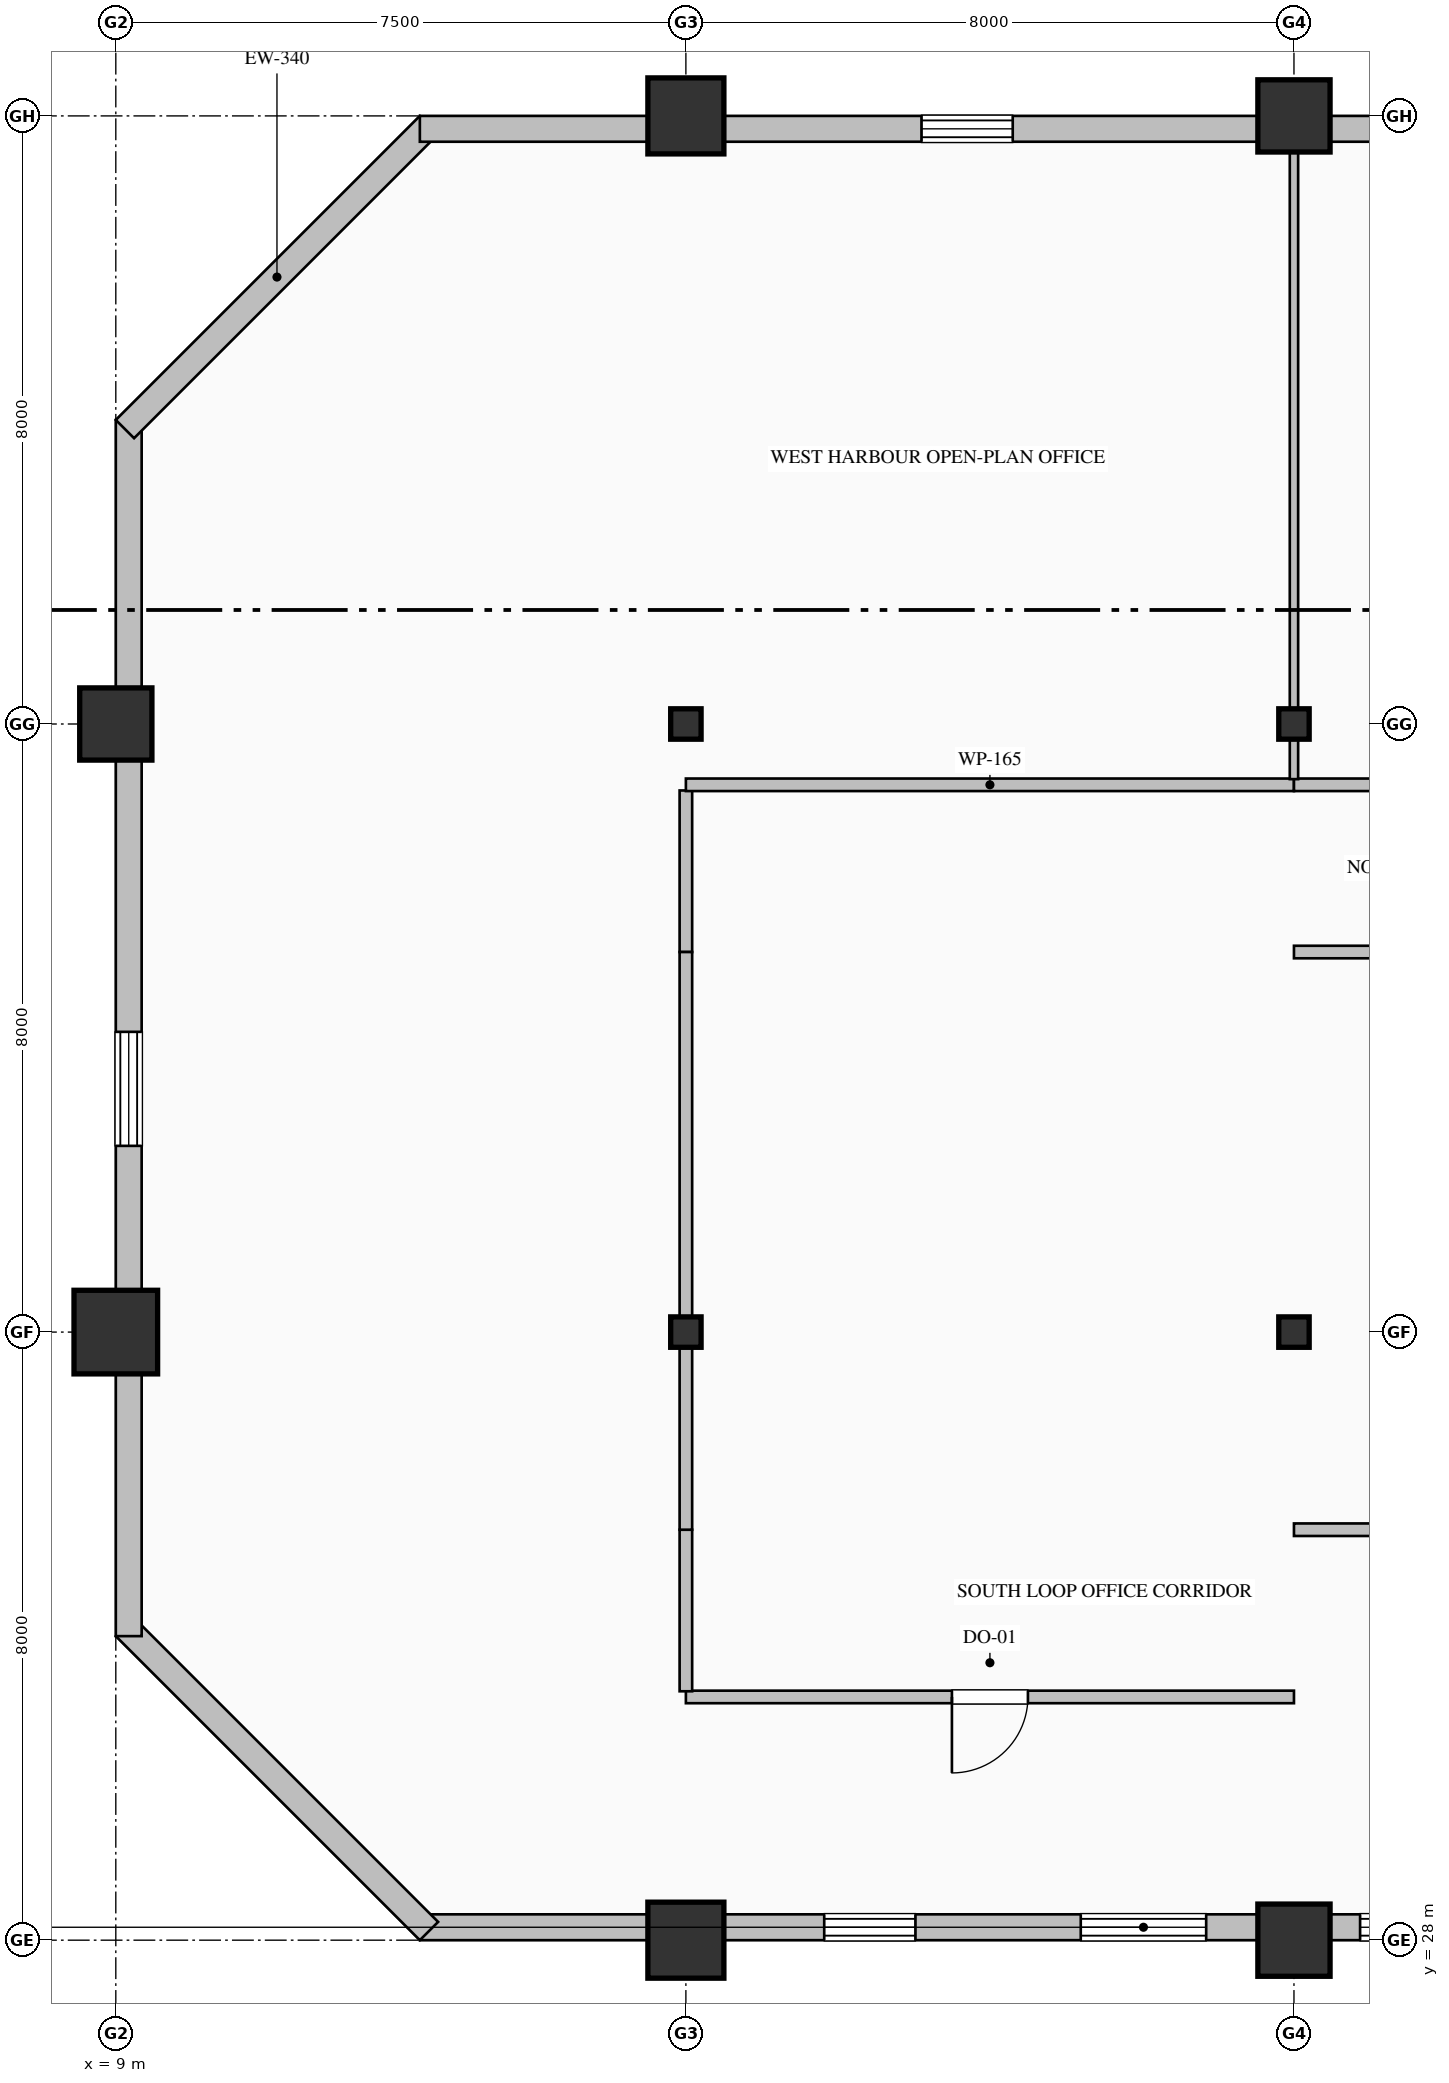
"""IFC4 building model, lengths in metres.
Left out: names, types, materials, properties, quantities, classifications, styles, units other than length and angle.
Written with IfcOpenShell. Run it as: python <this file> out.ifc"""

import sys

from ifc_helpers import new_model, si_unit, direction, frame, frame_2d, origin, origin_2d, place, context, subcontext, project, spatial, rectangle, hollow_rectangle, hollow_circle, i_section, extrude, element, fill, save


model = new_model("IFC4")
c1 = context("Model", 3, precision=1e-05, world=origin(), true_north=direction((0.0, 1.0)))
c2 = subcontext(c1, "Body", "Model", "MODEL_VIEW")
j1 = project(units=[si_unit("LENGTHUNIT", "METRE"), si_unit("PLANEANGLEUNIT", "RADIAN")], contexts=[c1])
p1 = place(None, origin())
s1 = spatial("IfcSite", under=j1, at=p1, CompositionType="ELEMENT")
p2 = place(p1, origin())
s2 = spatial("IfcBuilding", under=s1, at=p2, CompositionType="ELEMENT")
p3 = place(p2, frame((0.0, 0.0, 147.0)))
s3 = spatial("IfcBuildingStorey", under=s2, at=p3, CompositionType="ELEMENT", Elevation=147.0)
p4 = place(p3, frame((9.0, 36.0, 0.0), z_axis=(0.0, 0.0, 1.0), x_axis=(1.0, 0.0, 0.0)))
e1 = element("IfcColumn", 1, at=p4, inside=s3, PredefinedType="COLUMN", context=c2, shape_type="SweptSolid", body=[
    extrude(hollow_rectangle(XDim=1.1, YDim=1.1, WallThickness=0.04, at=origin_2d()), origin(), (0.0, 0.0, 1.0), 4.0),
])
p5 = place(p3, frame((9.0, 44.0, 0.0), z_axis=(0.0, 0.0, 1.0), x_axis=(1.0, 0.0, 0.0)))
e2 = element("IfcColumn", 2, at=p5, inside=s3, PredefinedType="COLUMN", context=c2, shape_type="SweptSolid", body=[
    extrude(hollow_rectangle(XDim=0.95, YDim=0.95, WallThickness=0.036, at=origin_2d()), origin(), (0.0, 0.0, 1.0), 4.0),
])
p6 = place(p3, frame((16.5, 28.0, 0.0), z_axis=(0.0, 0.0, 1.0), x_axis=(1.0, 0.0, 0.0)))
e3 = element("IfcColumn", 3, at=p6, inside=s3, PredefinedType="COLUMN", context=c2, shape_type="SweptSolid", body=[
    extrude(hollow_circle(Radius=0.5, WallThickness=0.036, at=origin_2d()), origin(), (0.0, 0.0, 1.0), 4.0),
])
for number, where, z_axis, x_axis in (
    (4, (16.5, 36.0, 0.0), (0.0, 0.0, 1.0), (1.0, 0.0, 0.0)),
    (5, (16.5, 44.0, 0.0), (0.0, 0.0, 1.0), (1.0, 0.0, 0.0)),
):
    element("IfcColumn", number, at=place(p3, frame(where, z_axis=z_axis, x_axis=x_axis)), inside=s3, PredefinedType="COLUMN", context=c2, shape_type="SweptSolid", body=[
        extrude(i_section(OverallWidth=0.4, OverallDepth=0.4, WebThickness=0.013, FlangeThickness=0.021, FilletRadius=0.022, at=origin_2d()), origin(), (0.0, 0.0, 1.0), 4.0),
    ])
p7 = place(p3, frame((16.5, 52.0, 0.0), z_axis=(0.0, 0.0, 1.0), x_axis=(1.0, 0.0, 0.0)))
e6 = element("IfcColumn", 6, at=p7, inside=s3, PredefinedType="COLUMN", context=c2, shape_type="SweptSolid", body=[
    extrude(hollow_circle(Radius=0.5, WallThickness=0.036, at=origin_2d()), origin(), (0.0, 0.0, 1.0), 4.0),
])
p8 = place(p3, frame((24.5, 28.0, 0.0), z_axis=(0.0, 0.0, 1.0), x_axis=(1.0, 0.0, 0.0)))
e7 = element("IfcColumn", 7, at=p8, inside=s3, PredefinedType="COLUMN", context=c2, shape_type="SweptSolid", body=[
    extrude(hollow_rectangle(XDim=0.95, YDim=0.95, WallThickness=0.036, at=origin_2d()), origin(), (0.0, 0.0, 1.0), 4.0),
])
for number, where, z_axis, x_axis in (
    (8, (24.5, 36.0, 0.0), (0.0, 0.0, 1.0), (1.0, 0.0, 0.0)),
    (9, (24.5, 44.0, 0.0), (0.0, 0.0, 1.0), (1.0, 0.0, 0.0)),
):
    element("IfcColumn", number, at=place(p3, frame(where, z_axis=z_axis, x_axis=x_axis)), inside=s3, PredefinedType="COLUMN", context=c2, shape_type="SweptSolid", body=[
        extrude(i_section(OverallWidth=0.4, OverallDepth=0.4, WebThickness=0.013, FlangeThickness=0.021, FilletRadius=0.022, at=origin_2d()), origin(), (0.0, 0.0, 1.0), 4.0),
    ])
p9 = place(p3, frame((24.5, 52.0, 0.0), z_axis=(0.0, 0.0, 1.0), x_axis=(1.0, 0.0, 0.0)))
e10 = element("IfcColumn", 10, at=p9, inside=s3, PredefinedType="COLUMN", context=c2, shape_type="SweptSolid", body=[
    extrude(hollow_rectangle(XDim=0.95, YDim=0.95, WallThickness=0.036, at=origin_2d()), origin(), (0.0, 0.0, 1.0), 4.0),
])
p10 = place(p3, frame((40.52, 28.17, 0.0), z_axis=(0.0, 0.0, 1.0), x_axis=(-1.0, 0.0, 0.0)))
e11 = element("IfcWall", 11, at=p10, inside=s3, PredefinedType="SOLIDWALL", context=c2, shape_type="SweptSolid", body=[
    extrude(rectangle(XDim=27.52, YDim=0.34, at=frame_2d((13.76, 0.0))), origin(), (0.0, 0.0, 1.0), 3.165),
])
p11 = place(p10, frame((2.85, 0.0, 0.85)))
e12 = element("IfcOpeningElement", 12, at=p11, cuts=e11, PredefinedType="OPENING", context=c2, shape_type="SweptSolid", body=[
    extrude(rectangle(XDim=1.5, YDim=1.95, at=frame_2d((0.75, 0.975))), frame((0.0, 0.18, 0.0), z_axis=(0.0, -1.0, 0.0), x_axis=(1.0, 0.0, 0.0)), (0.0, 0.0, 1.0), 0.36),
])
p12 = place(p10, frame((10.2, 0.0, 0.7)))
e13 = element("IfcOpeningElement", 13, at=p12, cuts=e11, PredefinedType="OPENING", context=c2, shape_type="SweptSolid", body=[
    extrude(rectangle(XDim=1.2, YDim=1.85, at=frame_2d((0.6, 0.925))), frame((0.0, 0.18, 0.0), z_axis=(0.0, -1.0, 0.0), x_axis=(1.0, 0.0, 0.0)), (0.0, 0.0, 1.0), 0.36),
])
p13 = place(p10, frame((13.65, 0.0, 0.85)))
e14 = element("IfcOpeningElement", 14, at=p13, cuts=e11, PredefinedType="OPENING", context=c2, shape_type="SweptSolid", body=[
    extrude(rectangle(XDim=1.5, YDim=1.95, at=frame_2d((0.75, 0.975))), frame((0.0, 0.18, 0.0), z_axis=(0.0, -1.0, 0.0), x_axis=(1.0, 0.0, 0.0)), (0.0, 0.0, 1.0), 0.36),
])
p14 = place(p10, frame((17.175, 0.0, 0.85)))
e15 = element("IfcOpeningElement", 15, at=p14, cuts=e11, PredefinedType="OPENING", context=c2, shape_type="SweptSolid", body=[
    extrude(rectangle(XDim=1.65, YDim=1.95, at=frame_2d((0.825, 0.975))), frame((0.0, 0.18, 0.0), z_axis=(0.0, -1.0, 0.0), x_axis=(1.0, 0.0, 0.0)), (0.0, 0.0, 1.0), 0.36),
])
p15 = place(p10, frame((21.0, 0.0, 0.7)))
e16 = element("IfcOpeningElement", 16, at=p15, cuts=e11, PredefinedType="OPENING", context=c2, shape_type="SweptSolid", body=[
    extrude(rectangle(XDim=1.2, YDim=1.85, at=frame_2d((0.6, 0.925))), frame((0.0, 0.18, 0.0), z_axis=(0.0, -1.0, 0.0), x_axis=(1.0, 0.0, 0.0)), (0.0, 0.0, 1.0), 0.36),
])
p16 = place(p3, frame((13.12, 28.12, 0.0), z_axis=(0.0, 0.0, 1.0), x_axis=(-0.707106781187, 0.707106781187, 0.0)))
e17 = element("IfcWall", 17, at=p16, inside=s3, PredefinedType="SOLIDWALL", context=c2, shape_type="SweptSolid", body=[
    extrude(rectangle(XDim=5.657, YDim=0.34, at=frame_2d((2.828, 0.0))), origin(), (0.0, 0.0, 1.0), 3.765),
])
p17 = place(p3, frame((9.17, 32.0, 0.0), z_axis=(0.0, 0.0, 1.0), x_axis=(0.0, 1.0, 0.0)))
e18 = element("IfcWall", 18, at=p17, inside=s3, PredefinedType="SOLIDWALL", context=c2, shape_type="SweptSolid", body=[
    extrude(rectangle(XDim=16.0, YDim=0.34, at=frame_2d((8.0, 0.0))), origin(), (0.0, 0.0, 1.0), 3.265),
])
p18 = place(p17, frame((6.45, 0.0, 0.85)))
e19 = element("IfcOpeningElement", 19, at=p18, cuts=e18, PredefinedType="OPENING", context=c2, shape_type="SweptSolid", body=[
    extrude(rectangle(XDim=1.5, YDim=1.95, at=frame_2d((0.75, 0.975))), frame((0.0, 0.18, 0.0), z_axis=(0.0, -1.0, 0.0), x_axis=(1.0, 0.0, 0.0)), (0.0, 0.0, 1.0), 0.36),
])
p19 = place(p3, frame((9.12, 47.88, 0.0), z_axis=(0.0, 0.0, 1.0), x_axis=(0.707106781187, 0.707106781187, 0.0)))
e20 = element("IfcWall", 20, at=p19, inside=s3, PredefinedType="SOLIDWALL", context=c2, shape_type="SweptSolid", body=[
    extrude(rectangle(XDim=5.657, YDim=0.34, at=frame_2d((2.828, 0.0))), origin(), (0.0, 0.0, 1.0), 3.765),
])
p20 = place(p3, frame((13.0, 51.83, 0.0), z_axis=(0.0, 0.0, 1.0), x_axis=(1.0, 0.0, 0.0)))
e21 = element("IfcWall", 21, at=p20, inside=s3, PredefinedType="SOLIDWALL", context=c2, shape_type="SweptSolid", body=[
    extrude(rectangle(XDim=27.52, YDim=0.34, at=frame_2d((13.76, 0.0))), origin(), (0.0, 0.0, 1.0), 3.265),
])
p21 = place(p20, frame((6.6, 0.0, 0.7)))
e22 = element("IfcOpeningElement", 22, at=p21, cuts=e21, PredefinedType="OPENING", context=c2, shape_type="SweptSolid", body=[
    extrude(rectangle(XDim=1.2, YDim=1.85, at=frame_2d((0.6, 0.925))), frame((0.0, 0.18, 0.0), z_axis=(0.0, -1.0, 0.0), x_axis=(1.0, 0.0, 0.0)), (0.0, 0.0, 1.0), 0.36),
])
p22 = place(p20, frame((13.575, 0.0, 0.85)))
e23 = element("IfcOpeningElement", 23, at=p22, cuts=e21, PredefinedType="OPENING", context=c2, shape_type="SweptSolid", body=[
    extrude(rectangle(XDim=1.65, YDim=1.95, at=frame_2d((0.825, 0.975))), frame((0.0, 0.18, 0.0), z_axis=(0.0, -1.0, 0.0), x_axis=(1.0, 0.0, 0.0)), (0.0, 0.0, 1.0), 0.36),
])
p23 = place(p3, frame((24.5, 31.2, 0.0), z_axis=(0.0, 0.0, 1.0), x_axis=(-1.0, 0.0, 0.0)))
e24 = element("IfcWall", 24, at=p23, inside=s3, PredefinedType="PARTITIONING", context=c2, shape_type="SweptSolid", body=[
    extrude(rectangle(XDim=8.0, YDim=0.165, at=frame_2d((4.0, 0.0))), origin(), (0.0, 0.0, 1.0), 3.765),
])
p24 = place(p23, frame((3.5, 0.0, 0.0)))
e25 = element("IfcOpeningElement", 25, at=p24, cuts=e24, PredefinedType="OPENING", context=c2, shape_type="SweptSolid", body=[
    extrude(rectangle(XDim=1.0, YDim=2.15, at=frame_2d((0.5, 1.075))), frame((0.0, 0.093, 0.0), z_axis=(0.0, -1.0, 0.0), x_axis=(1.0, 0.0, 0.0)), (0.0, 0.0, 1.0), 0.185),
])
p25 = place(p3, frame((16.5, 31.274, 0.0), z_axis=(0.0, 0.0, 1.0), x_axis=(0.0, 1.0, 0.0)))
e26 = element("IfcWall", 26, at=p25, inside=s3, PredefinedType="PARTITIONING", context=c2, shape_type="SweptSolid", body=[
    extrude(rectangle(XDim=2.125, YDim=0.165, at=frame_2d((1.063, 0.0))), origin(), (0.0, 0.0, 1.0), 3.157),
])
p26 = place(p3, frame((24.5, 33.4, 0.0), z_axis=(0.0, 0.0, 1.0), x_axis=(1.0, 0.0, 0.0)))
e27 = element("IfcWall", 27, at=p26, inside=s3, PredefinedType="PARTITIONING", context=c2, shape_type="SweptSolid", body=[
    extrude(rectangle(XDim=6.5, YDim=0.165, at=frame_2d((3.25, 0.0))), origin(), (0.0, 0.0, 1.0), 3.765),
])
p27 = place(p26, frame((2.75, 0.0, 0.0)))
e28 = element("IfcOpeningElement", 28, at=p27, cuts=e27, PredefinedType="OPENING", context=c2, shape_type="SweptSolid", body=[
    extrude(rectangle(XDim=1.0, YDim=2.15, at=frame_2d((0.5, 1.075))), frame((0.0, 0.093, 0.0), z_axis=(0.0, -1.0, 0.0), x_axis=(1.0, 0.0, 0.0)), (0.0, 0.0, 1.0), 0.185),
])
p28 = place(p3, frame((16.5, 41.0, 0.0), z_axis=(0.0, 0.0, 1.0), x_axis=(0.0, 1.0, 0.0)))
e29 = element("IfcWall", 29, at=p28, inside=s3, PredefinedType="PARTITIONING", context=c2, shape_type="SweptSolid", body=[
    extrude(rectangle(XDim=2.125, YDim=0.165, at=frame_2d((1.063, 0.0))), origin(), (0.0, 0.0, 1.0), 3.157),
])
p29 = place(p3, frame((16.5, 43.2, 0.0), z_axis=(0.0, 0.0, 1.0), x_axis=(1.0, 0.0, 0.0)))
e30 = element("IfcWall", 30, at=p29, inside=s3, PredefinedType="PARTITIONING", context=c2, shape_type="SweptSolid", body=[
    extrude(rectangle(XDim=8.0, YDim=0.165, at=frame_2d((4.0, 0.0))), origin(), (0.0, 0.0, 1.0), 3.765),
])
p30 = place(p3, frame((24.5, 43.2, 0.0), z_axis=(0.0, 0.0, 1.0), x_axis=(1.0, 0.0, 0.0)))
e31 = element("IfcWall", 31, at=p30, inside=s3, PredefinedType="PARTITIONING", context=c2, shape_type="SweptSolid", body=[
    extrude(rectangle(XDim=13.3, YDim=0.165, at=frame_2d((6.65, 0.0))), origin(), (0.0, 0.0, 1.0), 3.765),
])
p31 = place(p30, frame((6.2, 0.0, 0.0)))
e32 = element("IfcOpeningElement", 32, at=p31, cuts=e31, PredefinedType="OPENING", context=c2, shape_type="SweptSolid", body=[
    extrude(rectangle(XDim=0.9, YDim=2.15, at=frame_2d((0.45, 1.075))), frame((0.0, 0.093, 0.0), z_axis=(0.0, -1.0, 0.0), x_axis=(1.0, 0.0, 0.0)), (0.0, 0.0, 1.0), 0.185),
])
p32 = place(p3, frame((31.0, 41.0, 0.0), z_axis=(0.0, 0.0, 1.0), x_axis=(-1.0, 0.0, 0.0)))
e33 = element("IfcWall", 33, at=p32, inside=s3, PredefinedType="PARTITIONING", context=c2, shape_type="SweptSolid", body=[
    extrude(rectangle(XDim=6.5, YDim=0.165, at=frame_2d((3.25, 0.0))), origin(), (0.0, 0.0, 1.0), 3.765),
])
p33 = place(p3, frame((16.5, 33.4, 0.0), z_axis=(0.0, 0.0, 1.0), x_axis=(0.0, 1.0, 0.0)))
e34 = element("IfcWall", 34, at=p33, inside=s3, PredefinedType="PARTITIONING", context=c2, shape_type="SweptSolid", body=[
    extrude(rectangle(XDim=7.6, YDim=0.165, at=frame_2d((3.8, 0.0))), origin(), (0.0, 0.0, 1.0), 3.157),
])
p34 = place(p3, frame((24.5, 51.668, 0.0), z_axis=(0.0, 0.0, 1.0), x_axis=(0.0, -1.0, 0.0)))
e35 = element("IfcWall", 35, at=p34, inside=s3, PredefinedType="MOVABLE", context=c2, shape_type="SweptSolid", body=[
    extrude(rectangle(XDim=8.394, YDim=0.11, at=frame_2d((4.197, 0.0))), origin(), (0.0, 0.0, 1.0), 3.157),
])
p35 = place(p13, origin())
e36 = element("IfcWindow", 36, at=p35, inside=s3, PartitioningType="DOUBLE_PANEL_VERTICAL", PredefinedType="WINDOW", context=c2, shape_type="SweptSolid", body=[
    extrude(rectangle(XDim=1.5, YDim=1.95, at=frame_2d((0.75, 0.975))), frame((0.0, 0.15, 0.0), z_axis=(0.0, -1.0, 0.0), x_axis=(1.0, 0.0, 0.0)), (0.0, 0.0, 1.0), 0.06),
])
fill(e14, e36)
p36 = place(p14, origin())
e37 = element("IfcWindow", 37, at=p36, inside=s3, PartitioningType="DOUBLE_PANEL_VERTICAL", PredefinedType="WINDOW", context=c2, shape_type="SweptSolid", body=[
    extrude(rectangle(XDim=1.65, YDim=1.95, at=frame_2d((0.825, 0.975))), frame((0.0, 0.15, 0.0), z_axis=(0.0, -1.0, 0.0), x_axis=(1.0, 0.0, 0.0)), (0.0, 0.0, 1.0), 0.06),
])
fill(e15, e37)
p37 = place(p15, origin())
e38 = element("IfcWindow", 38, at=p37, inside=s3, PartitioningType="DOUBLE_PANEL_VERTICAL", PredefinedType="WINDOW", context=c2, shape_type="SweptSolid", body=[
    extrude(rectangle(XDim=1.2, YDim=1.85, at=frame_2d((0.6, 0.925))), frame((0.0, 0.15, 0.0), z_axis=(0.0, -1.0, 0.0), x_axis=(1.0, 0.0, 0.0)), (0.0, 0.0, 1.0), 0.06),
])
fill(e16, e38)
p38 = place(p18, origin())
e39 = element("IfcWindow", 39, at=p38, inside=s3, PartitioningType="DOUBLE_PANEL_VERTICAL", PredefinedType="WINDOW", context=c2, shape_type="SweptSolid", body=[
    extrude(rectangle(XDim=1.5, YDim=1.95, at=frame_2d((0.75, 0.975))), frame((0.0, 0.15, 0.0), z_axis=(0.0, -1.0, 0.0), x_axis=(1.0, 0.0, 0.0)), (0.0, 0.0, 1.0), 0.06),
])
fill(e19, e39)
p39 = place(p21, origin())
e40 = element("IfcWindow", 40, at=p39, inside=s3, PartitioningType="DOUBLE_PANEL_VERTICAL", PredefinedType="WINDOW", context=c2, shape_type="SweptSolid", body=[
    extrude(rectangle(XDim=1.2, YDim=1.85, at=frame_2d((0.6, 0.925))), frame((0.0, 0.15, 0.0), z_axis=(0.0, -1.0, 0.0), x_axis=(1.0, 0.0, 0.0)), (0.0, 0.0, 1.0), 0.06),
])
fill(e22, e40)
p40 = place(p24, origin())
e41 = element("IfcDoor", 41, at=p40, inside=s3, OperationType="SINGLE_SWING_RIGHT", PredefinedType="DOOR", context=c2, shape_type="SweptSolid", body=[
    extrude(rectangle(XDim=1.0, YDim=2.15, at=frame_2d((0.5, 1.075))), frame((0.0, 0.025, 0.0), z_axis=(0.0, -1.0, 0.0), x_axis=(1.0, 0.0, 0.0)), (0.0, 0.0, 1.0), 0.05),
])
fill(e25, e41)
save(model, sys.argv[1])
